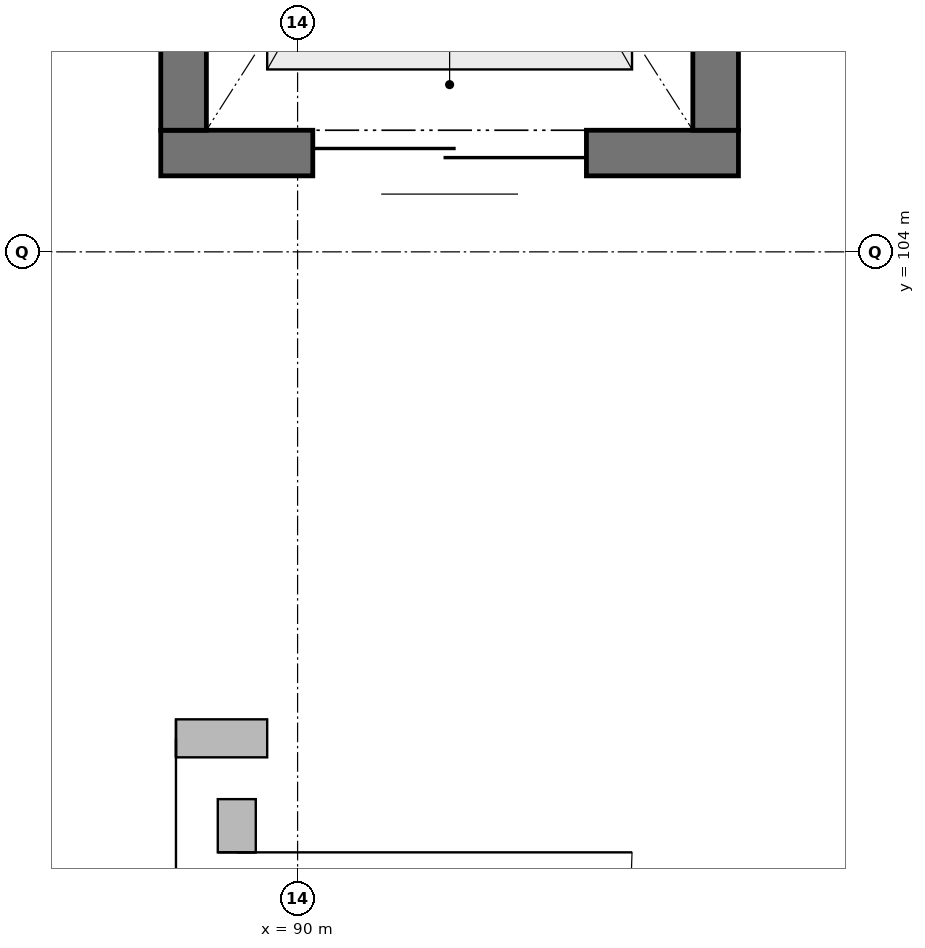
"""IFC4 building model, lengths in metres.
Left out: names, types, materials, properties, quantities, classifications, styles, units other than length and angle.
Written with IfcOpenShell. Run it as: python <this file> out.ifc"""

import sys

from ifc_helpers import new_model, si_unit, direction, frame, frame_2d, origin, place, context, subcontext, project, spatial, rectangle, extrude, element, fill, save


model = new_model("IFC4")
c1 = context("Model", 3, precision=1e-05, world=origin(), true_north=direction((0.0, 1.0)))
c2 = subcontext(c1, "Body", "Model", "MODEL_VIEW")
j1 = project(units=[si_unit("LENGTHUNIT", "METRE"), si_unit("PLANEANGLEUNIT", "RADIAN")], contexts=[c1])
p1 = place(None, origin())
s1 = spatial("IfcSite", under=j1, at=p1, CompositionType="ELEMENT")
p2 = place(p1, origin())
s2 = spatial("IfcBuilding", under=s1, at=p2, CompositionType="ELEMENT")
p3 = place(p2, origin())
s3 = spatial("IfcBuildingStorey", under=s2, at=p3, CompositionType="ELEMENT", Elevation=0.0)
p4 = place(p3, frame((92.9, 104.65, 0.0), z_axis=(0.0, 0.0, 1.0), x_axis=(-1.0, 0.0, 0.0)))
e1 = element("IfcWall", 1, at=p4, inside=s3, PredefinedType="SOLIDWALL", context=c2, shape_type="SweptSolid", body=[
    extrude(rectangle(XDim=3.8, YDim=0.3, at=frame_2d((1.9, 0.0))), origin(), (0.0, 0.0, 1.0), 4.8),
])
p5 = place(p4, frame((1.0, 0.0, 0.0)))
e2 = element("IfcOpeningElement", 2, at=p5, cuts=e1, PredefinedType="OPENING", context=c2, shape_type="SweptSolid", body=[
    extrude(rectangle(XDim=1.8, YDim=2.4, at=frame_2d((0.9, 1.2))), frame((0.0, 0.17, 0.0), z_axis=(0.0, -1.0, 0.0), x_axis=(1.0, 0.0, 0.0)), (0.0, 0.0, 1.0), 0.34),
])
for number, where, z_axis, x_axis in (
    (3, (89.25, 104.8, 0.0), (0.0, 0.0, 1.0), (0.0, 1.0, 0.0)),
    (4, (92.75, 109.8, 0.0), (0.0, 0.0, 1.0), (0.0, -1.0, 0.0)),
):
    element("IfcWall", number, at=place(p3, frame(where, z_axis=z_axis, x_axis=x_axis)), inside=s3, PredefinedType="SOLIDWALL", context=c2, shape_type="SweptSolid", body=[
        extrude(rectangle(XDim=5.0, YDim=0.3, at=frame_2d((2.5, 0.0))), origin(), (0.0, 0.0, 1.0), 4.8),
    ])
p6 = place(p3, frame((89.6, 100.4, 0.0), z_axis=(0.0, 0.0, 1.0), x_axis=(0.0, -1.0, 0.0)))
e5 = element("IfcWall", 5, at=p6, inside=s3, PredefinedType="PARTITIONING", context=c2, shape_type="SweptSolid", body=[
    extrude(rectangle(XDim=3.83, YDim=0.25, at=frame_2d((1.915, 0.0))), origin(), (0.0, 0.0, 1.0), 4.54),
])
p7 = place(p6, frame((0.35, 0.0, 0.0)))
e6 = element("IfcOpeningElement", 6, at=p7, cuts=e5, PredefinedType="OPENING", context=c2, shape_type="SweptSolid", body=[
    extrude(rectangle(XDim=2.6, YDim=3.2, at=frame_2d((1.3, 1.6))), frame((0.0, 0.145, 0.0), z_axis=(0.0, -1.0, 0.0), x_axis=(1.0, 0.0, 0.0)), (0.0, 0.0, 1.0), 0.29),
])
p8 = place(p3, frame((89.8, 100.8, 0.0), z_axis=(0.0, 0.0, 1.0), x_axis=(-1.0, 0.0, 0.0)))
e7 = element("IfcWall", 7, at=p8, inside=s3, PredefinedType="PARTITIONING", context=c2, shape_type="SweptSolid", body=[
    extrude(rectangle(XDim=21.8, YDim=0.25, at=frame_2d((10.9, 0.0))), origin(), (0.0, 0.0, 1.0), 4.56),
])
p9 = place(p8, frame((0.6, 0.0, 0.0)))
e8 = element("IfcOpeningElement", 8, at=p9, cuts=e7, PredefinedType="OPENING", context=c2, shape_type="SweptSolid", body=[
    extrude(rectangle(XDim=2.6, YDim=3.2, at=frame_2d((1.3, 1.6))), frame((0.0, 0.145, 0.0), z_axis=(0.0, -1.0, 0.0), x_axis=(1.0, 0.0, 0.0)), (0.0, 0.0, 1.0), 0.29),
])
p10 = place(p5, origin())
e9 = element("IfcDoor", 9, at=p10, inside=s3, OperationType="DOUBLE_DOOR_SLIDING", PredefinedType="DOOR", context=c2, shape_type="SweptSolid", body=[
    extrude(rectangle(XDim=1.8, YDim=2.4, at=frame_2d((0.9, 1.2))), frame((0.0, 0.025, 0.0), z_axis=(0.0, -1.0, 0.0), x_axis=(1.0, 0.0, 0.0)), (0.0, 0.0, 1.0), 0.05),
])
fill(e2, e9)
p11 = place(p7, origin())
e10 = element("IfcDoor", 10, at=p11, inside=s3, OperationType="DOUBLE_DOOR_SINGLE_SWING", PredefinedType="DOOR", context=c2, shape_type="SweptSolid", body=[
    extrude(rectangle(XDim=2.6, YDim=3.2, at=frame_2d((1.3, 1.6))), frame((0.0, 0.025, 0.0), z_axis=(0.0, -1.0, 0.0), x_axis=(1.0, 0.0, 0.0)), (0.0, 0.0, 1.0), 0.05),
])
fill(e6, e10)
p12 = place(p9, origin())
e11 = element("IfcDoor", 11, at=p12, inside=s3, OperationType="DOUBLE_DOOR_SINGLE_SWING", PredefinedType="DOOR", context=c2, shape_type="SweptSolid", body=[
    extrude(rectangle(XDim=2.6, YDim=3.2, at=frame_2d((1.3, 1.6))), frame((0.0, 0.025, 0.0), z_axis=(0.0, -1.0, 0.0), x_axis=(1.0, 0.0, 0.0)), (0.0, 0.0, 1.0), 0.05),
])
fill(e8, e11)
save(model, sys.argv[1])
